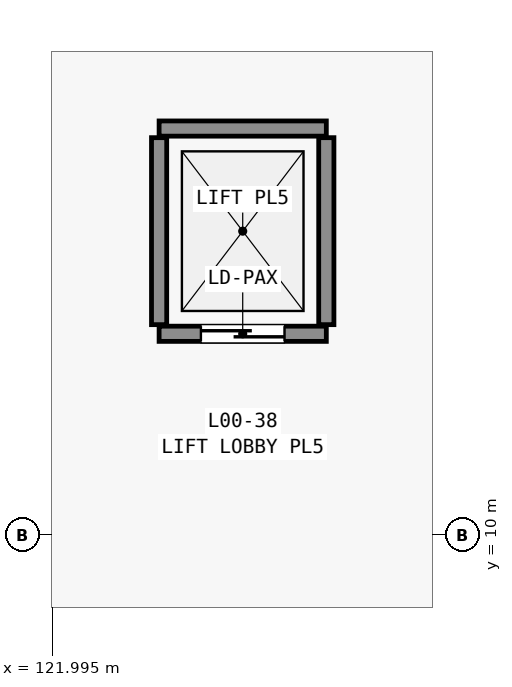
"""IFC4 building model, lengths in metres.
Left out: names, types, materials, properties, quantities, classifications, styles, units other than length and angle.
Written with IfcOpenShell. Run it as: python <this file> out.ifc"""

import sys

from ifc_helpers import new_model, si_unit, direction, frame, frame_2d, origin, place, context, subcontext, project, spatial, rectangle, extrude, element, fill, save


model = new_model("IFC4")
c1 = context("Model", 3, precision=1e-05, world=origin(), true_north=direction((0.0, 1.0)))
c2 = subcontext(c1, "Body", "Model", "MODEL_VIEW")
j1 = project(units=[si_unit("LENGTHUNIT", "METRE"), si_unit("PLANEANGLEUNIT", "RADIAN")], contexts=[c1])
p1 = place(None, origin())
s1 = spatial("IfcSite", under=j1, at=p1, CompositionType="ELEMENT")
p2 = place(p1, origin())
s2 = spatial("IfcBuilding", under=s1, at=p2, CompositionType="ELEMENT")
p3 = place(p2, origin())
s3 = spatial("IfcBuildingStorey", under=s2, at=p3, CompositionType="ELEMENT", Elevation=0.0)
p4 = place(p3, frame((123.4, 12.65, 0.0), z_axis=(0.0, 0.0, 1.0), x_axis=(1.0, 0.0, 0.0)))
e1 = element("IfcWall", 1, at=p4, inside=s3, PredefinedType="STANDARD", context=c2, shape_type="SweptSolid", body=[
    extrude(rectangle(XDim=2.2, YDim=0.2, at=frame_2d((1.1, 0.0))), origin(), (0.0, 0.0, 1.0), 5.64),
])
p5 = place(p4, frame((0.55, 0.0, 0.0)))
e2 = element("IfcOpeningElement", 2, at=p5, cuts=e1, PredefinedType="OPENING", context=c2, shape_type="SweptSolid", body=[
    extrude(rectangle(XDim=1.1, YDim=2.15, at=frame_2d((0.55, 1.075))), frame((0.0, 0.11, 0.0), z_axis=(0.0, -1.0, 0.0), x_axis=(1.0, 0.0, 0.0)), (0.0, 0.0, 1.0), 0.22),
])
p6 = place(p3, frame((123.4, 15.35, 0.0), z_axis=(0.0, 0.0, 1.0), x_axis=(1.0, 0.0, 0.0)))
e3 = element("IfcWall", 3, at=p6, inside=s3, PredefinedType="STANDARD", context=c2, shape_type="SweptSolid", body=[
    extrude(rectangle(XDim=2.2, YDim=0.2, at=frame_2d((1.1, 0.0))), origin(), (0.0, 0.0, 1.0), 5.64),
])
for number, where, z_axis, x_axis in (
    (4, (123.4, 12.77, 0.0), (0.0, 0.0, 1.0), (0.0, 1.0, 0.0)),
    (5, (125.6, 12.77, 0.0), (0.0, 0.0, 1.0), (0.0, 1.0, 0.0)),
):
    element("IfcWall", number, at=place(p3, frame(where, z_axis=z_axis, x_axis=x_axis)), inside=s3, PredefinedType="STANDARD", context=c2, shape_type="SweptSolid", body=[
        extrude(rectangle(XDim=2.46, YDim=0.2, at=frame_2d((1.23, 0.0))), origin(), (0.0, 0.0, 1.0), 5.64),
    ])
p7 = place(p5, origin())
e6 = element("IfcDoor", 6, at=p7, inside=s3, OperationType="SLIDING_TO_LEFT", PredefinedType="DOOR", context=c2, shape_type="SweptSolid", body=[
    extrude(rectangle(XDim=1.1, YDim=2.15, at=frame_2d((0.55, 1.075))), frame((0.0, 0.025, 0.0), z_axis=(0.0, -1.0, 0.0), x_axis=(1.0, 0.0, 0.0)), (0.0, 0.0, 1.0), 0.05),
])
fill(e2, e6)
save(model, sys.argv[1])
